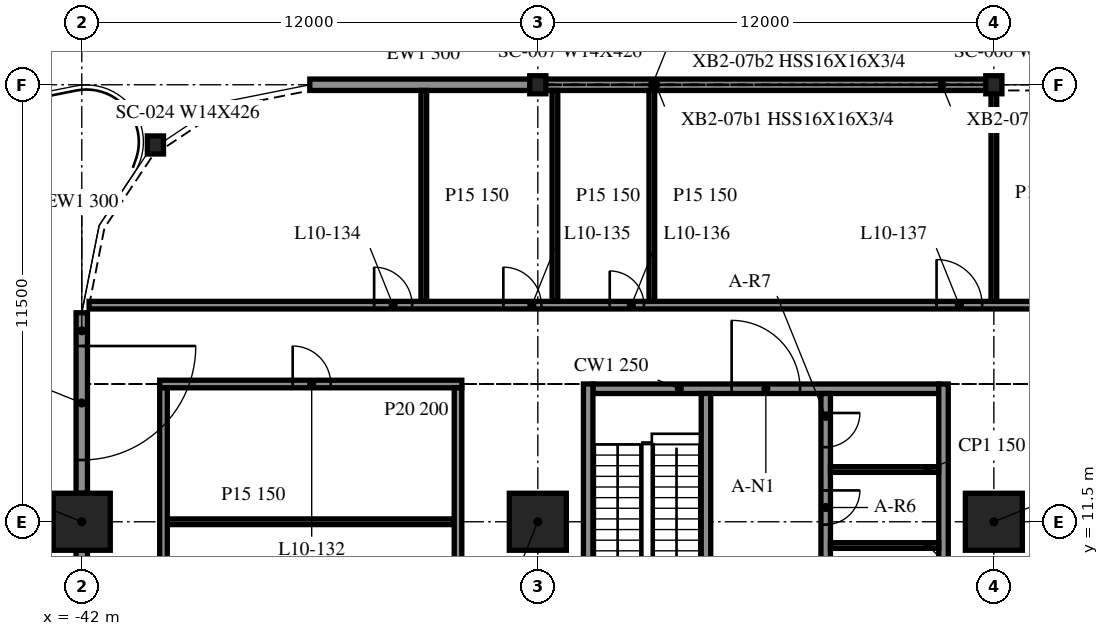
"""IFC4 building model, lengths in metres.
Left out: names, types, materials, properties, quantities, classifications, styles, units other than length and angle.
Written with IfcOpenShell. Run it as: python <this file> out.ifc"""

import sys

from ifc_helpers import new_model, si_unit, direction, frame, frame_2d, origin, origin_2d, place, context, subcontext, project, spatial, rectangle, i_section, extrude, element, fill, save


model = new_model("IFC4")
c1 = context("Model", 3, precision=1e-05, world=origin(), true_north=direction((0.0, 1.0)))
c2 = subcontext(c1, "Body", "Model", "MODEL_VIEW")
j1 = project(units=[si_unit("LENGTHUNIT", "METRE"), si_unit("PLANEANGLEUNIT", "RADIAN")], contexts=[c1])
p1 = place(None, origin())
s1 = spatial("IfcSite", under=j1, at=p1, CompositionType="ELEMENT")
p2 = place(p1, origin())
s2 = spatial("IfcBuilding", under=s1, at=p2, CompositionType="ELEMENT")
p3 = place(p2, frame((0.0, 0.0, 46.0)))
s3 = spatial("IfcBuildingStorey", under=s2, at=p3, CompositionType="ELEMENT", Elevation=46.0)
for number, where, z_axis, x_axis in (
    (1, (-42.0, 11.5, -0.34), (0.0, 0.0, 1.0), (1.0, 0.0, 0.0)),
    (2, (-30.0, 11.5, -0.34), (0.0, 0.0, 1.0), (1.0, 0.0, 0.0)),
    (3, (-18.0, 11.5, -0.34), (0.0, 0.0, 1.0), (1.0, 0.0, 0.0)),
):
    element("IfcColumn", number, at=place(p3, frame(where, z_axis=z_axis, x_axis=x_axis)), inside=s3, PredefinedType="COLUMN", context=c2, shape_type="SweptSolid", body=[
        extrude(rectangle(XDim=1.5, YDim=1.5, at=origin_2d()), origin(), (0.0, 0.0, 1.0), 4.3),
    ])
for number, where, z_axis, x_axis in (
    (4, (-18.0, 23.0, -0.34), (0.0, 0.0, 1.0), (1.0, 0.0, 0.0)),
    (5, (-30.0, 23.0, -0.34), (0.0, 0.0, 1.0), (1.0, 0.0, 0.0)),
    (6, (-40.062, 21.416, -0.34), (0.0, 0.0, 1.0), (1.0, 0.0, 0.0)),
):
    element("IfcColumn", number, at=place(p3, frame(where, z_axis=z_axis, x_axis=x_axis)), inside=s3, PredefinedType="COLUMN", context=c2, shape_type="SweptSolid", body=[
        extrude(i_section(OverallWidth=0.424, OverallDepth=0.475, WebThickness=0.048, FlangeThickness=0.077, at=origin_2d()), origin(), (0.0, 0.0, 1.0), 4.3),
    ])
p4 = place(p3, frame((-18.024, 23.0, 0.0), z_axis=(0.0, 0.0, 1.0), x_axis=(-1.0, 0.0, 0.0)))
e7 = element("IfcWall", 7, at=p4, inside=s3, PredefinedType="NOTDEFINED", context=c2, shape_type="SweptSolid", body=[
    extrude(rectangle(XDim=11.952, YDim=0.3, at=frame_2d((5.976, 0.0))), origin(), (0.0, 0.0, 1.0), 3.203),
])
p5 = place(p3, frame((-30.024, 23.0, 0.0), z_axis=(0.0, 0.0, 1.0), x_axis=(-1.0, 0.0, 0.0)))
e8 = element("IfcWall", 8, at=p5, inside=s3, PredefinedType="NOTDEFINED", context=c2, shape_type="SweptSolid", body=[
    extrude(rectangle(XDim=5.976, YDim=0.3, at=frame_2d((2.988, 0.0))), origin(), (0.0, 0.0, 1.0), 3.203),
])
p6 = place(p3, frame((-42.0, 17.0, 0.0), z_axis=(0.0, 0.0, 1.0), x_axis=(0.0, -1.0, 0.0)))
e9 = element("IfcWall", 9, at=p6, inside=s3, PredefinedType="NOTDEFINED", context=c2, shape_type="SweptSolid", body=[
    extrude(rectangle(XDim=4.75, YDim=0.3, at=frame_2d((2.375, 0.0))), origin(), (0.0, 0.0, 1.0), 3.203),
])
p7 = place(p6, frame((0.875, 0.0, 0.0)))
e10 = element("IfcOpeningElement", 10, at=p7, cuts=e9, PredefinedType="OPENING", context=c2, shape_type="SweptSolid", body=[
    extrude(rectangle(XDim=3.0, YDim=2.4, at=frame_2d((1.5, 1.2))), frame((0.0, 0.16, 0.0), z_axis=(0.0, -1.0, 0.0), x_axis=(1.0, 0.0, 0.0)), (0.0, 0.0, 1.0), 0.32),
])
p8 = place(p3, frame((-42.0, 10.75, 0.0), z_axis=(0.0, 0.0, 1.0), x_axis=(0.0, -1.0, 0.0)))
e11 = element("IfcWall", 11, at=p8, inside=s3, PredefinedType="NOTDEFINED", context=c2, shape_type="SweptSolid", body=[
    extrude(rectangle(XDim=10.0, YDim=0.3, at=frame_2d((5.0, 0.0))), origin(), (0.0, 0.0, 1.0), 3.203),
])
p9 = place(p8, frame((3.5, 0.0, 0.0)))
e12 = element("IfcOpeningElement", 12, at=p9, cuts=e11, PredefinedType="OPENING", context=c2, shape_type="SweptSolid", body=[
    extrude(rectangle(XDim=3.0, YDim=2.4, at=frame_2d((1.5, 1.2))), frame((0.0, 0.16, 0.0), z_axis=(0.0, -1.0, 0.0), x_axis=(1.0, 0.0, 0.0)), (0.0, 0.0, 1.0), 0.32),
])
for number, where, z_axis, x_axis in (
    (13, (-28.675, 15.125, 0.0), (0.0, 0.0, 1.0), (0.0, -1.0, 0.0)),
    (14, (-19.325, -9.125, 0.0), (0.0, 0.0, 1.0), (0.0, 1.0, 0.0)),
):
    element("IfcWall", number, at=place(p3, frame(where, z_axis=z_axis, x_axis=x_axis)), inside=s3, PredefinedType="SOLIDWALL", context=c2, shape_type="SweptSolid", body=[
        extrude(rectangle(XDim=24.25, YDim=0.25, at=frame_2d((12.125, 0.0))), origin(), (0.0, 0.0, 1.0), 3.96),
    ])
p10 = place(p3, frame((-28.55, 15.0, 0.0), z_axis=(0.0, 0.0, 1.0), x_axis=(1.0, 0.0, 0.0)))
e15 = element("IfcWall", 15, at=p10, inside=s3, PredefinedType="SOLIDWALL", context=c2, shape_type="SweptSolid", body=[
    extrude(rectangle(XDim=9.1, YDim=0.25, at=frame_2d((4.55, 0.0))), origin(), (0.0, 0.0, 1.0), 3.96),
])
p11 = place(p10, frame((3.65, 0.0, 0.0)))
e16 = element("IfcOpeningElement", 16, at=p11, cuts=e15, PredefinedType="OPENING", context=c2, shape_type="SweptSolid", body=[
    extrude(rectangle(XDim=1.8, YDim=2.1, at=frame_2d((0.9, 1.05))), frame((0.0, 0.135, 0.0), z_axis=(0.0, -1.0, 0.0), x_axis=(1.0, 0.0, 0.0)), (0.0, 0.0, 1.0), 0.27),
])
p12 = place(p3, frame((-25.575, 14.875, 0.0), z_axis=(0.0, 0.0, 1.0), x_axis=(0.0, -1.0, 0.0)))
e17 = element("IfcWall", 17, at=p12, inside=s3, PredefinedType="SOLIDWALL", context=c2, shape_type="SweptSolid", body=[
    extrude(rectangle(XDim=6.25, YDim=0.25, at=frame_2d((3.125, 0.0))), origin(), (0.0, 0.0, 1.0), 3.96),
])
p13 = place(p12, frame((4.85, 0.0, 0.0)))
e18 = element("IfcOpeningElement", 18, at=p13, cuts=e17, PredefinedType="OPENING", context=c2, shape_type="SweptSolid", body=[
    extrude(rectangle(XDim=1.0, YDim=2.1, at=frame_2d((0.5, 1.05))), frame((0.0, 0.135, 0.0), z_axis=(0.0, -1.0, 0.0), x_axis=(1.0, 0.0, 0.0)), (0.0, 0.0, 1.0), 0.27),
])
p14 = place(p3, frame((-22.425, 14.875, 0.0), z_axis=(0.0, 0.0, 1.0), x_axis=(0.0, -1.0, 0.0)))
e19 = element("IfcWall", 19, at=p14, inside=s3, PredefinedType="SOLIDWALL", context=c2, shape_type="SweptSolid", body=[
    extrude(rectangle(XDim=23.75, YDim=0.25, at=frame_2d((11.875, 0.0))), origin(), (0.0, 0.0, 1.0), 3.96),
])
p15 = place(p14, frame((15.45, 0.0, 0.0)))
e20 = element("IfcOpeningElement", 20, at=p15, cuts=e19, PredefinedType="OPENING", context=c2, shape_type="SweptSolid", body=[
    extrude(rectangle(XDim=1.1, YDim=2.1, at=frame_2d((0.55, 1.05))), frame((0.0, 0.135, 0.0), z_axis=(0.0, -1.0, 0.0), x_axis=(1.0, 0.0, 0.0)), (0.0, 0.0, 1.0), 0.27),
])
p16 = place(p14, frame((12.7, 0.0, 0.0)))
e21 = element("IfcOpeningElement", 21, at=p16, cuts=e19, PredefinedType="OPENING", context=c2, shape_type="SweptSolid", body=[
    extrude(rectangle(XDim=1.1, YDim=2.1, at=frame_2d((0.55, 1.05))), frame((0.0, 0.135, 0.0), z_axis=(0.0, -1.0, 0.0), x_axis=(1.0, 0.0, 0.0)), (0.0, 0.0, 1.0), 0.27),
])
p17 = place(p14, frame((21.837, 0.0, 0.0)))
e22 = element("IfcOpeningElement", 22, at=p17, cuts=e19, PredefinedType="OPENING", context=c2, shape_type="SweptSolid", body=[
    extrude(rectangle(XDim=0.9, YDim=2.1, at=frame_2d((0.45, 1.05))), frame((0.0, 0.135, 0.0), z_axis=(0.0, -1.0, 0.0), x_axis=(1.0, 0.0, 0.0)), (0.0, 0.0, 1.0), 0.27),
])
p18 = place(p14, frame((18.762, 0.0, 0.0)))
e23 = element("IfcOpeningElement", 23, at=p18, cuts=e19, PredefinedType="OPENING", context=c2, shape_type="SweptSolid", body=[
    extrude(rectangle(XDim=0.9, YDim=2.1, at=frame_2d((0.45, 1.05))), frame((0.0, 0.135, 0.0), z_axis=(0.0, -1.0, 0.0), x_axis=(1.0, 0.0, 0.0)), (0.0, 0.0, 1.0), 0.27),
])
p19 = place(p14, frame((4.587, 0.0, 0.0)))
e24 = element("IfcOpeningElement", 24, at=p19, cuts=e19, PredefinedType="OPENING", context=c2, shape_type="SweptSolid", body=[
    extrude(rectangle(XDim=0.9, YDim=2.1, at=frame_2d((0.45, 1.05))), frame((0.0, 0.135, 0.0), z_axis=(0.0, -1.0, 0.0), x_axis=(1.0, 0.0, 0.0)), (0.0, 0.0, 1.0), 0.27),
])
p20 = place(p14, frame((2.55, 0.0, 0.0)))
e25 = element("IfcOpeningElement", 25, at=p20, cuts=e19, PredefinedType="OPENING", context=c2, shape_type="SweptSolid", body=[
    extrude(rectangle(XDim=0.9, YDim=2.1, at=frame_2d((0.45, 1.05))), frame((0.0, 0.135, 0.0), z_axis=(0.0, -1.0, 0.0), x_axis=(1.0, 0.0, 0.0)), (0.0, 0.0, 1.0), 0.27),
])
p21 = place(p14, frame((0.512, 0.0, 0.0)))
e26 = element("IfcOpeningElement", 26, at=p21, cuts=e19, PredefinedType="OPENING", context=c2, shape_type="SweptSolid", body=[
    extrude(rectangle(XDim=0.9, YDim=2.1, at=frame_2d((0.45, 1.05))), frame((0.0, 0.135, 0.0), z_axis=(0.0, -1.0, 0.0), x_axis=(1.0, 0.0, 0.0)), (0.0, 0.0, 1.0), 0.27),
])
for number, where, z_axis, x_axis in (
    (27, (-22.3, 10.875, 0.0), (0.0, 0.0, 1.0), (1.0, 0.0, 0.0)),
    (28, (-22.3, 12.875, 0.0), (0.0, 0.0, 1.0), (1.0, 0.0, 0.0)),
):
    element("IfcWall", number, at=place(p3, frame(where, z_axis=z_axis, x_axis=x_axis)), inside=s3, PredefinedType="PARTITIONING", context=c2, shape_type="SweptSolid", body=[
        extrude(rectangle(XDim=2.85, YDim=0.15, at=frame_2d((1.425, 0.0))), origin(), (0.0, 0.0, 1.0), 3.96),
    ])
p22 = place(p3, frame((-39.75, 11.5, 0.0), z_axis=(0.0, 0.0, 1.0), x_axis=(1.0, 0.0, 0.0)))
e29 = element("IfcWall", 29, at=p22, inside=s3, PredefinedType="PARTITIONING", context=c2, shape_type="SweptSolid", body=[
    extrude(rectangle(XDim=7.55, YDim=0.15, at=frame_2d((3.775, 0.0))), origin(), (0.0, 0.0, 1.0), 3.96),
])
p23 = place(p3, frame((-39.95, 15.125, 0.0), z_axis=(0.0, 0.0, 1.0), x_axis=(1.0, 0.0, 0.0)))
e30 = element("IfcWall", 30, at=p23, inside=s3, PredefinedType="PARTITIONING", context=c2, shape_type="SweptSolid", body=[
    extrude(rectangle(XDim=7.95, YDim=0.2, at=frame_2d((3.975, 0.0))), origin(), (0.0, 0.0, 1.0), 3.96),
])
p24 = place(p23, frame((3.5, 0.0, 0.0)))
e31 = element("IfcOpeningElement", 31, at=p24, cuts=e30, PredefinedType="OPENING", context=c2, shape_type="SweptSolid", body=[
    extrude(rectangle(XDim=1.0, YDim=2.1, at=frame_2d((0.5, 1.05))), frame((0.0, 0.11, 0.0), z_axis=(0.0, -1.0, 0.0), x_axis=(1.0, 0.0, 0.0)), (0.0, 0.0, 1.0), 0.22),
])
p25 = place(p3, frame((-41.807, 17.2, 0.0), z_axis=(0.0, 0.0, 1.0), x_axis=(1.0, 0.0, 0.0)))
e32 = element("IfcWall", 32, at=p25, inside=s3, PredefinedType="PARTITIONING", context=c2, shape_type="SweptSolid", body=[
    extrude(rectangle(XDim=95.615, YDim=0.2, at=frame_2d((47.807, 0.0))), origin(), (0.0, 0.0, 1.0), 3.96),
])
p26 = place(p25, frame((7.5, 0.0, 0.0)))
e33 = element("IfcOpeningElement", 33, at=p26, cuts=e32, PredefinedType="OPENING", context=c2, shape_type="SweptSolid", body=[
    extrude(rectangle(XDim=1.0, YDim=2.1, at=frame_2d((0.5, 1.05))), frame((0.0, 0.11, 0.0), z_axis=(0.0, -1.0, 0.0), x_axis=(1.0, 0.0, 0.0)), (0.0, 0.0, 1.0), 0.22),
])
p27 = place(p25, frame((10.9, 0.0, 0.0)))
e34 = element("IfcOpeningElement", 34, at=p27, cuts=e32, PredefinedType="OPENING", context=c2, shape_type="SweptSolid", body=[
    extrude(rectangle(XDim=1.0, YDim=2.1, at=frame_2d((0.5, 1.05))), frame((0.0, 0.11, 0.0), z_axis=(0.0, -1.0, 0.0), x_axis=(1.0, 0.0, 0.0)), (0.0, 0.0, 1.0), 0.22),
])
p28 = place(p25, frame((13.7, 0.0, 0.0)))
e35 = element("IfcOpeningElement", 35, at=p28, cuts=e32, PredefinedType="OPENING", context=c2, shape_type="SweptSolid", body=[
    extrude(rectangle(XDim=0.9, YDim=2.1, at=frame_2d((0.45, 1.05))), frame((0.0, 0.11, 0.0), z_axis=(0.0, -1.0, 0.0), x_axis=(1.0, 0.0, 0.0)), (0.0, 0.0, 1.0), 0.22),
])
p29 = place(p25, frame((22.3, 0.0, 0.0)))
e36 = element("IfcOpeningElement", 36, at=p29, cuts=e32, PredefinedType="OPENING", context=c2, shape_type="SweptSolid", body=[
    extrude(rectangle(XDim=1.2, YDim=2.1, at=frame_2d((0.6, 1.05))), frame((0.0, 0.11, 0.0), z_axis=(0.0, -1.0, 0.0), x_axis=(1.0, 0.0, 0.0)), (0.0, 0.0, 1.0), 0.22),
])
p30 = place(p25, frame((28.7, 0.0, 0.0)))
e37 = element("IfcOpeningElement", 37, at=p30, cuts=e32, PredefinedType="OPENING", context=c2, shape_type="SweptSolid", body=[
    extrude(rectangle(XDim=0.9, YDim=2.1, at=frame_2d((0.45, 1.05))), frame((0.0, 0.11, 0.0), z_axis=(0.0, -1.0, 0.0), x_axis=(1.0, 0.0, 0.0)), (0.0, 0.0, 1.0), 0.22),
])
p31 = place(p25, frame((37.5, 0.0, 0.0)))
e38 = element("IfcOpeningElement", 38, at=p31, cuts=e32, PredefinedType="OPENING", context=c2, shape_type="SweptSolid", body=[
    extrude(rectangle(XDim=1.0, YDim=2.1, at=frame_2d((0.5, 1.05))), frame((0.0, 0.11, 0.0), z_axis=(0.0, -1.0, 0.0), x_axis=(1.0, 0.0, 0.0)), (0.0, 0.0, 1.0), 0.22),
])
p32 = place(p25, frame((40.9, 0.0, 0.0)))
e39 = element("IfcOpeningElement", 39, at=p32, cuts=e32, PredefinedType="OPENING", context=c2, shape_type="SweptSolid", body=[
    extrude(rectangle(XDim=1.0, YDim=2.1, at=frame_2d((0.5, 1.05))), frame((0.0, 0.11, 0.0), z_axis=(0.0, -1.0, 0.0), x_axis=(1.0, 0.0, 0.0)), (0.0, 0.0, 1.0), 0.22),
])
p33 = place(p25, frame((43.7, 0.0, 0.0)))
e40 = element("IfcOpeningElement", 40, at=p33, cuts=e32, PredefinedType="OPENING", context=c2, shape_type="SweptSolid", body=[
    extrude(rectangle(XDim=0.9, YDim=2.1, at=frame_2d((0.45, 1.05))), frame((0.0, 0.11, 0.0), z_axis=(0.0, -1.0, 0.0), x_axis=(1.0, 0.0, 0.0)), (0.0, 0.0, 1.0), 0.22),
])
p34 = place(p25, frame((47.3, 0.0, 0.0)))
e41 = element("IfcOpeningElement", 41, at=p34, cuts=e32, PredefinedType="OPENING", context=c2, shape_type="SweptSolid", body=[
    extrude(rectangle(XDim=1.2, YDim=2.1, at=frame_2d((0.6, 1.05))), frame((0.0, 0.11, 0.0), z_axis=(0.0, -1.0, 0.0), x_axis=(1.0, 0.0, 0.0)), (0.0, 0.0, 1.0), 0.22),
])
p35 = place(p25, frame((54.1, 0.0, 0.0)))
e42 = element("IfcOpeningElement", 42, at=p35, cuts=e32, PredefinedType="OPENING", context=c2, shape_type="SweptSolid", body=[
    extrude(rectangle(XDim=0.9, YDim=2.1, at=frame_2d((0.45, 1.05))), frame((0.0, 0.11, 0.0), z_axis=(0.0, -1.0, 0.0), x_axis=(1.0, 0.0, 0.0)), (0.0, 0.0, 1.0), 0.22),
])
p36 = place(p25, frame((60.1, 0.0, 0.0)))
e43 = element("IfcOpeningElement", 43, at=p36, cuts=e32, PredefinedType="OPENING", context=c2, shape_type="SweptSolid", body=[
    extrude(rectangle(XDim=1.0, YDim=2.1, at=frame_2d((0.5, 1.05))), frame((0.0, 0.11, 0.0), z_axis=(0.0, -1.0, 0.0), x_axis=(1.0, 0.0, 0.0)), (0.0, 0.0, 1.0), 0.22),
])
p37 = place(p25, frame((69.1, 0.0, 0.0)))
e44 = element("IfcOpeningElement", 44, at=p37, cuts=e32, PredefinedType="OPENING", context=c2, shape_type="SweptSolid", body=[
    extrude(rectangle(XDim=1.0, YDim=2.1, at=frame_2d((0.5, 1.05))), frame((0.0, 0.11, 0.0), z_axis=(0.0, -1.0, 0.0), x_axis=(1.0, 0.0, 0.0)), (0.0, 0.0, 1.0), 0.22),
])
p38 = place(p25, frame((72.5, 0.0, 0.0)))
e45 = element("IfcOpeningElement", 45, at=p38, cuts=e32, PredefinedType="OPENING", context=c2, shape_type="SweptSolid", body=[
    extrude(rectangle(XDim=0.9, YDim=2.1, at=frame_2d((0.45, 1.05))), frame((0.0, 0.11, 0.0), z_axis=(0.0, -1.0, 0.0), x_axis=(1.0, 0.0, 0.0)), (0.0, 0.0, 1.0), 0.22),
])
p39 = place(p25, frame((75.1, 0.0, 0.0)))
e46 = element("IfcOpeningElement", 46, at=p39, cuts=e32, PredefinedType="OPENING", context=c2, shape_type="SweptSolid", body=[
    extrude(rectangle(XDim=1.2, YDim=2.1, at=frame_2d((0.6, 1.05))), frame((0.0, 0.11, 0.0), z_axis=(0.0, -1.0, 0.0), x_axis=(1.0, 0.0, 0.0)), (0.0, 0.0, 1.0), 0.22),
])
p40 = place(p25, frame((84.1, 0.0, 0.0)))
e47 = element("IfcOpeningElement", 47, at=p40, cuts=e32, PredefinedType="OPENING", context=c2, shape_type="SweptSolid", body=[
    extrude(rectangle(XDim=0.9, YDim=2.1, at=frame_2d((0.45, 1.05))), frame((0.0, 0.11, 0.0), z_axis=(0.0, -1.0, 0.0), x_axis=(1.0, 0.0, 0.0)), (0.0, 0.0, 1.0), 0.22),
])
p41 = place(p25, frame((90.1, 0.0, 0.0)))
e48 = element("IfcOpeningElement", 48, at=p41, cuts=e32, PredefinedType="OPENING", context=c2, shape_type="SweptSolid", body=[
    extrude(rectangle(XDim=1.0, YDim=2.1, at=frame_2d((0.5, 1.05))), frame((0.0, 0.11, 0.0), z_axis=(0.0, -1.0, 0.0), x_axis=(1.0, 0.0, 0.0)), (0.0, 0.0, 1.0), 0.22),
])
p42 = place(p3, frame((-39.85, -9.025, 0.0), z_axis=(0.0, 0.0, 1.0), x_axis=(0.0, 1.0, 0.0)))
e49 = element("IfcWall", 49, at=p42, inside=s3, PredefinedType="PARTITIONING", context=c2, shape_type="SweptSolid", body=[
    extrude(rectangle(XDim=24.05, YDim=0.2, at=frame_2d((12.025, 0.0))), origin(), (0.0, 0.0, 1.0), 3.96),
])
p43 = place(p42, frame((11.5, 0.0, 0.0)))
e50 = element("IfcOpeningElement", 50, at=p43, cuts=e49, PredefinedType="OPENING", context=c2, shape_type="SweptSolid", body=[
    extrude(rectangle(XDim=1.2, YDim=2.1, at=frame_2d((0.6, 1.05))), frame((0.0, 0.11, 0.0), z_axis=(0.0, -1.0, 0.0), x_axis=(1.0, 0.0, 0.0)), (0.0, 0.0, 1.0), 0.22),
])
p44 = place(p3, frame((-33.0, 17.3, 0.0), z_axis=(0.0, 0.0, 1.0), x_axis=(0.0, 1.0, 0.0)))
e51 = element("IfcWall", 51, at=p44, inside=s3, PredefinedType="PARTITIONING", context=c2, shape_type="SweptSolid", body=[
    extrude(rectangle(XDim=5.55, YDim=0.15, at=frame_2d((2.775, 0.0))), origin(), (0.0, 0.0, 1.0), 3.96),
])
p45 = place(p3, frame((-32.1, -9.025, 0.0), z_axis=(0.0, 0.0, 1.0), x_axis=(0.0, 1.0, 0.0)))
e52 = element("IfcWall", 52, at=p45, inside=s3, PredefinedType="PARTITIONING", context=c2, shape_type="SweptSolid", body=[
    extrude(rectangle(XDim=24.05, YDim=0.2, at=frame_2d((12.025, 0.0))), origin(), (0.0, 0.0, 1.0), 3.96),
])
for number, where, z_axis, x_axis in (
    (53, (-29.55, 17.3, 0.0), (0.0, 0.0, 1.0), (0.0, 1.0, 0.0)),
    (54, (-27.0, 17.3, 0.0), (0.0, 0.0, 1.0), (0.0, 1.0, 0.0)),
):
    element("IfcWall", number, at=place(p3, frame(where, z_axis=z_axis, x_axis=x_axis)), inside=s3, PredefinedType="PARTITIONING", context=c2, shape_type="SweptSolid", body=[
        extrude(rectangle(XDim=5.55, YDim=0.15, at=frame_2d((2.775, 0.0))), origin(), (0.0, 0.0, 1.0), 3.96),
    ])
p46 = place(p3, frame((-18.0, 17.3, 0.0), z_axis=(0.0, 0.0, 1.0), x_axis=(0.0, 1.0, 0.0)))
e55 = element("IfcWall", 55, at=p46, inside=s3, PredefinedType="PARTITIONING", context=c2, shape_type="SweptSolid", body=[
    extrude(rectangle(XDim=5.675, YDim=0.15, at=frame_2d((2.837, 0.0))), origin(), (0.0, 0.0, 1.0), 3.96),
])
p47 = place(p7, origin())
e56 = element("IfcDoor", 56, at=p47, inside=s3, OperationType="SINGLE_SWING_LEFT", PredefinedType="DOOR", context=c2, shape_type="SweptSolid", body=[
    extrude(rectangle(XDim=3.0, YDim=2.4, at=frame_2d((1.5, 1.2))), frame((0.0, 0.025, 0.0), z_axis=(0.0, -1.0, 0.0), x_axis=(1.0, 0.0, 0.0)), (0.0, 0.0, 1.0), 0.05),
])
fill(e10, e56)
p48 = place(p11, origin())
e57 = element("IfcDoor", 57, at=p48, inside=s3, OperationType="DOUBLE_DOOR_SINGLE_SWING", PredefinedType="DOOR", context=c2, shape_type="SweptSolid", body=[
    extrude(rectangle(XDim=1.8, YDim=2.1, at=frame_2d((0.9, 1.05))), frame((0.0, 0.025, 0.0), z_axis=(0.0, -1.0, 0.0), x_axis=(1.0, 0.0, 0.0)), (0.0, 0.0, 1.0), 0.05),
])
fill(e16, e57)
p49 = place(p20, origin())
e58 = element("IfcDoor", 58, at=p49, inside=s3, OperationType="SINGLE_SWING_RIGHT", PredefinedType="DOOR", context=c2, shape_type="SweptSolid", body=[
    extrude(rectangle(XDim=0.9, YDim=2.1, at=frame_2d((0.45, 1.05))), frame((0.0, 0.025, 0.0), z_axis=(0.0, -1.0, 0.0), x_axis=(1.0, 0.0, 0.0)), (0.0, 0.0, 1.0), 0.05),
])
fill(e25, e58)
p50 = place(p21, origin())
e59 = element("IfcDoor", 59, at=p50, inside=s3, OperationType="SINGLE_SWING_LEFT", PredefinedType="DOOR", context=c2, shape_type="SweptSolid", body=[
    extrude(rectangle(XDim=0.9, YDim=2.1, at=frame_2d((0.45, 1.05))), frame((0.0, 0.025, 0.0), z_axis=(0.0, -1.0, 0.0), x_axis=(1.0, 0.0, 0.0)), (0.0, 0.0, 1.0), 0.05),
])
fill(e26, e59)
p51 = place(p24, origin())
e60 = element("IfcDoor", 60, at=p51, inside=s3, OperationType="SINGLE_SWING_LEFT", PredefinedType="DOOR", context=c2, shape_type="SweptSolid", body=[
    extrude(rectangle(XDim=1.0, YDim=2.1, at=frame_2d((0.5, 1.05))), frame((0.0, 0.025, 0.0), z_axis=(0.0, -1.0, 0.0), x_axis=(1.0, 0.0, 0.0)), (0.0, 0.0, 1.0), 0.05),
])
fill(e31, e60)
p52 = place(p26, origin())
e61 = element("IfcDoor", 61, at=p52, inside=s3, OperationType="SINGLE_SWING_LEFT", PredefinedType="DOOR", context=c2, shape_type="SweptSolid", body=[
    extrude(rectangle(XDim=1.0, YDim=2.1, at=frame_2d((0.5, 1.05))), frame((0.0, 0.025, 0.0), z_axis=(0.0, -1.0, 0.0), x_axis=(1.0, 0.0, 0.0)), (0.0, 0.0, 1.0), 0.05),
])
fill(e33, e61)
p53 = place(p27, origin())
e62 = element("IfcDoor", 62, at=p53, inside=s3, OperationType="SINGLE_SWING_LEFT", PredefinedType="DOOR", context=c2, shape_type="SweptSolid", body=[
    extrude(rectangle(XDim=1.0, YDim=2.1, at=frame_2d((0.5, 1.05))), frame((0.0, 0.025, 0.0), z_axis=(0.0, -1.0, 0.0), x_axis=(1.0, 0.0, 0.0)), (0.0, 0.0, 1.0), 0.05),
])
fill(e34, e62)
p54 = place(p28, origin())
e63 = element("IfcDoor", 63, at=p54, inside=s3, OperationType="SINGLE_SWING_LEFT", PredefinedType="DOOR", context=c2, shape_type="SweptSolid", body=[
    extrude(rectangle(XDim=0.9, YDim=2.1, at=frame_2d((0.45, 1.05))), frame((0.0, 0.025, 0.0), z_axis=(0.0, -1.0, 0.0), x_axis=(1.0, 0.0, 0.0)), (0.0, 0.0, 1.0), 0.05),
])
fill(e35, e63)
p55 = place(p29, origin())
e64 = element("IfcDoor", 64, at=p55, inside=s3, OperationType="SINGLE_SWING_LEFT", PredefinedType="DOOR", context=c2, shape_type="SweptSolid", body=[
    extrude(rectangle(XDim=1.2, YDim=2.1, at=frame_2d((0.6, 1.05))), frame((0.0, 0.025, 0.0), z_axis=(0.0, -1.0, 0.0), x_axis=(1.0, 0.0, 0.0)), (0.0, 0.0, 1.0), 0.05),
])
fill(e36, e64)
save(model, sys.argv[1])
